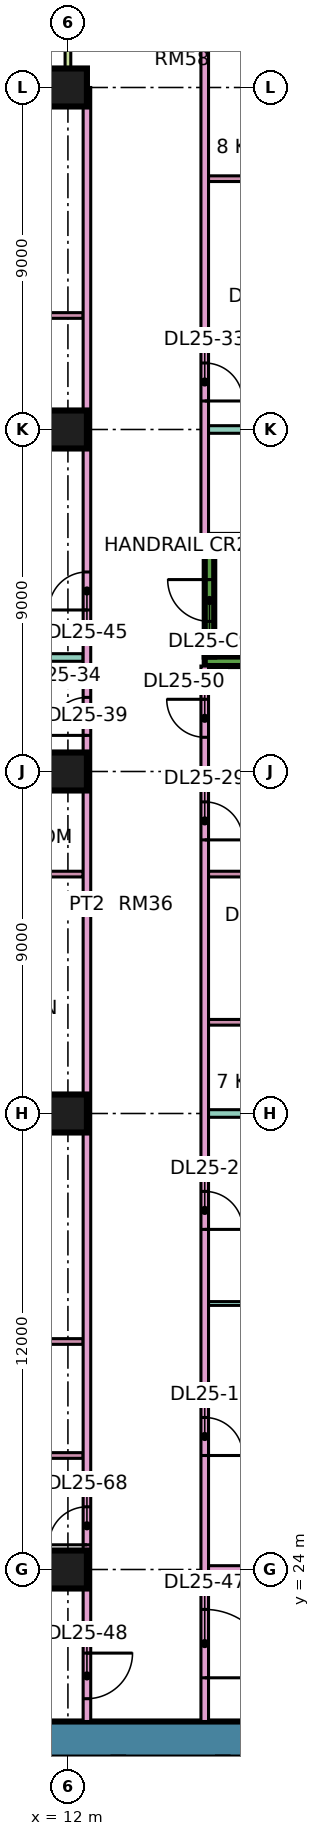
"""IFC4 building model, lengths in metres.
Left out: names, types, materials, properties, quantities, classifications, styles, units other than length and angle.
Written with IfcOpenShell. Run it as: python <this file> out.ifc"""

import sys

from ifc_helpers import new_model, si_unit, direction, frame, frame_2d, origin, origin_2d, place, context, subcontext, project, spatial, rectangle, extrude, element, fill, save


model = new_model("IFC4")
c1 = context("Model", 3, precision=1e-05, world=origin(), true_north=direction((0.0, 1.0)))
c2 = subcontext(c1, "Body", "Model", "MODEL_VIEW")
j1 = project(units=[si_unit("LENGTHUNIT", "METRE"), si_unit("PLANEANGLEUNIT", "RADIAN")], contexts=[c1])
p1 = place(None, origin())
s1 = spatial("IfcSite", under=j1, at=p1, CompositionType="ELEMENT")
p2 = place(p1, origin())
s2 = spatial("IfcBuilding", under=s1, at=p2, CompositionType="ELEMENT")
p3 = place(p2, frame((0.0, 0.0, 110.65)))
s3 = spatial("IfcBuildingStorey", under=s2, at=p3, CompositionType="ELEMENT", Elevation=110.65)
for number, where, z_axis, x_axis in (
    (1, (12.0, 24.0, 0.0), (0.0, 0.0, 1.0), (1.0, 0.0, 0.0)),
    (2, (12.0, 36.0, 0.0), (0.0, 0.0, 1.0), (1.0, 0.0, 0.0)),
    (3, (12.0, 45.0, 0.0), (0.0, 0.0, 1.0), (1.0, 0.0, 0.0)),
    (4, (12.0, 54.0, 0.0), (0.0, 0.0, 1.0), (1.0, 0.0, 0.0)),
    (5, (12.0, 63.0, 0.0), (0.0, 0.0, 1.0), (1.0, 0.0, 0.0)),
):
    element("IfcColumn", number, at=place(p3, frame(where, z_axis=z_axis, x_axis=x_axis)), inside=s3, PredefinedType="COLUMN", context=c2, shape_type="SweptSolid", body=[
        extrude(rectangle(XDim=1.0, YDim=1.0, at=origin_2d()), origin(), (0.0, 0.0, 1.0), 3.75),
    ])
p4 = place(p3, frame((9.0, 19.525, 0.0), z_axis=(0.0, 0.0, 1.0), x_axis=(1.0, 0.0, 0.0)))
e6 = element("IfcWall", 6, at=p4, inside=s3, PredefinedType="SHEAR", context=c2, shape_type="SweptSolid", body=[
    extrude(rectangle(XDim=25.0, YDim=0.95, at=frame_2d((12.5, 0.0))), origin(), (0.0, 0.0, 1.0), 3.75),
])
p5 = place(p4, frame((19.1, 0.0, 0.0)))
e7 = element("IfcOpeningElement", 7, at=p5, cuts=e6, PredefinedType="OPENING", context=c2, shape_type="SweptSolid", body=[
    extrude(rectangle(XDim=1.8, YDim=2.4, at=frame_2d((0.9, 1.2))), frame((0.0, 0.485, 0.0), z_axis=(0.0, -1.0, 0.0), x_axis=(1.0, 0.0, 0.0)), (0.0, 0.0, 1.0), 0.97),
])
for number, where, z_axis, x_axis in (
    (8, (15.6, 47.9, 0.0), (0.0, 0.0, 1.0), (1.0, 0.0, 0.0)),
    (9, (15.6, 51.1, 0.0), (0.0, 0.0, 1.0), (1.0, 0.0, 0.0)),
):
    element("IfcWall", number, at=place(p3, frame(where, z_axis=z_axis, x_axis=x_axis)), inside=s3, PredefinedType="SHEAR", context=c2, shape_type="SweptSolid", body=[
        extrude(rectangle(XDim=7.0, YDim=0.25, at=frame_2d((3.5, 0.0))), origin(), (0.0, 0.0, 1.0), 3.75),
    ])
p6 = place(p3, frame((15.725, 48.025, 0.0), z_axis=(0.0, 0.0, 1.0), x_axis=(0.0, 1.0, 0.0)))
e10 = element("IfcWall", 10, at=p6, inside=s3, PredefinedType="SHEAR", context=c2, shape_type="SweptSolid", body=[
    extrude(rectangle(XDim=2.95, YDim=0.25, at=frame_2d((1.475, 0.0))), origin(), (0.0, 0.0, 1.0), 3.75),
])
p7 = place(p6, frame((0.925, 0.0, 0.0)))
e11 = element("IfcOpeningElement", 11, at=p7, cuts=e10, PredefinedType="OPENING", context=c2, shape_type="SweptSolid", body=[
    extrude(rectangle(XDim=1.1, YDim=2.2, at=frame_2d((0.55, 1.1))), frame((0.0, 0.135, 0.0), z_axis=(0.0, -1.0, 0.0), x_axis=(1.0, 0.0, 0.0)), (0.0, 0.0, 1.0), 0.27),
])
p8 = place(p3, frame((11.925, 63.0, 0.0), z_axis=(0.0, 0.0, 1.0), x_axis=(-1.0, 0.0, 0.0)))
e12 = element("IfcWall", 12, at=p8, inside=s3, PredefinedType="SOLIDWALL", context=c2, shape_type="SweptSolid", body=[
    extrude(rectangle(XDim=10.35, YDim=0.15, at=frame_2d((5.175, 0.0))), origin(), (0.0, 0.0, 1.0), 3.35),
])
p9 = place(p8, frame((1.175, 0.0, 0.45)))
e13 = element("IfcOpeningElement", 13, at=p9, cuts=e12, PredefinedType="OPENING", context=c2, shape_type="SweptSolid", body=[
    extrude(rectangle(XDim=3.0, YDim=2.4, at=frame_2d((1.5, 1.2))), frame((0.0, 0.085, 0.0), z_axis=(0.0, -1.0, 0.0), x_axis=(1.0, 0.0, 0.0)), (0.0, 0.0, 1.0), 0.17),
])
p10 = place(p8, frame((7.288, 0.0, 0.0)))
e14 = element("IfcOpeningElement", 14, at=p10, cuts=e12, PredefinedType="OPENING", context=c2, shape_type="SweptSolid", body=[
    extrude(rectangle(XDim=1.8, YDim=2.4, at=frame_2d((0.9, 1.2))), frame((0.0, 0.085, 0.0), z_axis=(0.0, -1.0, 0.0), x_axis=(1.0, 0.0, 0.0)), (0.0, 0.0, 1.0), 0.17),
])
p11 = place(p3, frame((12.0, 64.5, 0.0), z_axis=(0.0, 0.0, 1.0), x_axis=(0.0, -1.0, 0.0)))
e15 = element("IfcWall", 15, at=p11, inside=s3, PredefinedType="SOLIDWALL", context=c2, shape_type="SweptSolid", body=[
    extrude(rectangle(XDim=1.5, YDim=0.15, at=frame_2d((0.75, 0.0))), origin(), (0.0, 0.0, 1.0), 3.35),
])
p12 = place(p3, frame((-1.35, 22.4, 0.0), z_axis=(0.0, 0.0, 1.0), x_axis=(1.0, 0.0, 0.0)))
e16 = element("IfcWall", 16, at=p12, inside=s3, PredefinedType="PARTITIONING", context=c2, shape_type="SweptSolid", body=[
    extrude(rectangle(XDim=13.75, YDim=0.2, at=frame_2d((6.875, 0.0))), origin(), (0.0, 0.0, 1.0), 3.35),
])
p13 = place(p3, frame((0.0, 36.0, 0.0), z_axis=(0.0, 0.0, 1.0), x_axis=(1.0, 0.0, 0.0)))
e17 = element("IfcWall", 17, at=p13, inside=s3, PredefinedType="PARTITIONING", context=c2, shape_type="SweptSolid", body=[
    extrude(rectangle(XDim=12.4, YDim=0.2, at=frame_2d((6.2, 0.0))), origin(), (0.0, 0.0, 1.0), 3.35),
])
p14 = place(p3, frame((0.0, 48.0, 0.0), z_axis=(0.0, 0.0, 1.0), x_axis=(1.0, 0.0, 0.0)))
e18 = element("IfcWall", 18, at=p14, inside=s3, PredefinedType="PARTITIONING", context=c2, shape_type="SweptSolid", body=[
    extrude(rectangle(XDim=12.4, YDim=0.2, at=frame_2d((6.2, 0.0))), origin(), (0.0, 0.0, 1.0), 3.35),
])
for number, where, z_axis, x_axis in (
    (19, (7.175, 27.0, 0.0), (0.0, 0.0, 1.0), (1.0, 0.0, 0.0)),
    (20, (7.175, 30.0, 0.0), (0.0, 0.0, 1.0), (1.0, 0.0, 0.0)),
    (21, (7.175, 53.7, 0.0), (0.0, 0.0, 1.0), (1.0, 0.0, 0.0)),
    (22, (7.175, 57.0, 0.0), (0.0, 0.0, 1.0), (1.0, 0.0, 0.0)),
):
    element("IfcWall", number, at=place(p3, frame(where, z_axis=z_axis, x_axis=x_axis)), inside=s3, PredefinedType="PARTITIONING", context=c2, shape_type="SweptSolid", body=[
        extrude(rectangle(XDim=5.225, YDim=0.15, at=frame_2d((2.612, 0.0))), origin(), (0.0, 0.0, 1.0), 3.35),
    ])
p15 = place(p3, frame((8.375, 42.3, 0.0), z_axis=(0.0, 0.0, 1.0), x_axis=(1.0, 0.0, 0.0)))
e23 = element("IfcWall", 23, at=p15, inside=s3, PredefinedType="PARTITIONING", context=c2, shape_type="SweptSolid", body=[
    extrude(rectangle(XDim=4.025, YDim=0.15, at=frame_2d((2.012, 0.0))), origin(), (0.0, 0.0, 1.0), 3.35),
])
p16 = place(p3, frame((8.375, 45.0, 0.0), z_axis=(0.0, 0.0, 1.0), x_axis=(1.0, 0.0, 0.0)))
e24 = element("IfcWall", 24, at=p16, inside=s3, PredefinedType="PARTITIONING", context=c2, shape_type="SweptSolid", body=[
    extrude(rectangle(XDim=4.025, YDim=0.15, at=frame_2d((2.012, 0.0))), origin(), (0.0, 0.0, 1.0), 3.35),
])
p17 = place(p16, frame((1.575, 0.0, 0.0)))
e25 = element("IfcOpeningElement", 25, at=p17, cuts=e24, PredefinedType="OPENING", context=c2, shape_type="SweptSolid", body=[
    extrude(rectangle(XDim=0.8, YDim=2.1, at=frame_2d((0.4, 1.05))), frame((0.0, 0.085, 0.0), z_axis=(0.0, -1.0, 0.0), x_axis=(1.0, 0.0, 0.0)), (0.0, 0.0, 1.0), 0.17),
])
p18 = place(p3, frame((12.5, 20.0, 0.0), z_axis=(0.0, 0.0, 1.0), x_axis=(0.0, 1.0, 0.0)))
e26 = element("IfcWall", 26, at=p18, inside=s3, PredefinedType="PARTITIONING", context=c2, shape_type="SweptSolid", body=[
    extrude(rectangle(XDim=43.0, YDim=0.2, at=frame_2d((21.5, 0.0))), origin(), (0.0, 0.0, 1.0), 3.35),
])
p19 = place(p18, frame((25.95, 0.0, 0.0)))
e27 = element("IfcOpeningElement", 27, at=p19, cuts=e26, PredefinedType="OPENING", context=c2, shape_type="SweptSolid", body=[
    extrude(rectangle(XDim=1.0, YDim=2.1, at=frame_2d((0.5, 1.05))), frame((0.0, 0.11, 0.0), z_axis=(0.0, -1.0, 0.0), x_axis=(1.0, 0.0, 0.0)), (0.0, 0.0, 1.0), 0.22),
])
p20 = place(p18, frame((29.25, 0.0, 0.0)))
e28 = element("IfcOpeningElement", 28, at=p20, cuts=e26, PredefinedType="OPENING", context=c2, shape_type="SweptSolid", body=[
    extrude(rectangle(XDim=1.0, YDim=2.1, at=frame_2d((0.5, 1.05))), frame((0.0, 0.11, 0.0), z_axis=(0.0, -1.0, 0.0), x_axis=(1.0, 0.0, 0.0)), (0.0, 0.0, 1.0), 0.22),
])
p21 = place(p18, frame((0.6, 0.0, 0.0)))
e29 = element("IfcOpeningElement", 29, at=p21, cuts=e26, PredefinedType="OPENING", context=c2, shape_type="SweptSolid", body=[
    extrude(rectangle(XDim=1.2, YDim=2.1, at=frame_2d((0.6, 1.05))), frame((0.0, 0.11, 0.0), z_axis=(0.0, -1.0, 0.0), x_axis=(1.0, 0.0, 0.0)), (0.0, 0.0, 1.0), 0.22),
])
p22 = place(p18, frame((4.65, 0.0, 0.0)))
e30 = element("IfcOpeningElement", 30, at=p22, cuts=e26, PredefinedType="OPENING", context=c2, shape_type="SweptSolid", body=[
    extrude(rectangle(XDim=1.0, YDim=2.1, at=frame_2d((0.5, 1.05))), frame((0.0, 0.11, 0.0), z_axis=(0.0, -1.0, 0.0), x_axis=(1.0, 0.0, 0.0)), (0.0, 0.0, 1.0), 0.22),
])
p23 = place(p3, frame((15.6, 20.0, 0.0), z_axis=(0.0, 0.0, 1.0), x_axis=(0.0, 1.0, 0.0)))
e31 = element("IfcWall", 31, at=p23, inside=s3, PredefinedType="PARTITIONING", context=c2, shape_type="SweptSolid", body=[
    extrude(rectangle(XDim=27.775, YDim=0.2, at=frame_2d((13.887, 0.0))), origin(), (0.0, 0.0, 1.0), 3.35),
])
p24 = place(p23, frame((7.0, 0.0, 0.0)))
e32 = element("IfcOpeningElement", 32, at=p24, cuts=e31, PredefinedType="OPENING", context=c2, shape_type="SweptSolid", body=[
    extrude(rectangle(XDim=1.0, YDim=2.1, at=frame_2d((0.5, 1.05))), frame((0.0, 0.11, 0.0), z_axis=(0.0, -1.0, 0.0), x_axis=(1.0, 0.0, 0.0)), (0.0, 0.0, 1.0), 0.22),
])
p25 = place(p23, frame((12.95, 0.0, 0.0)))
e33 = element("IfcOpeningElement", 33, at=p25, cuts=e31, PredefinedType="OPENING", context=c2, shape_type="SweptSolid", body=[
    extrude(rectangle(XDim=1.0, YDim=2.1, at=frame_2d((0.5, 1.05))), frame((0.0, 0.11, 0.0), z_axis=(0.0, -1.0, 0.0), x_axis=(1.0, 0.0, 0.0)), (0.0, 0.0, 1.0), 0.22),
])
p26 = place(p23, frame((23.2, 0.0, 0.0)))
e34 = element("IfcOpeningElement", 34, at=p26, cuts=e31, PredefinedType="OPENING", context=c2, shape_type="SweptSolid", body=[
    extrude(rectangle(XDim=1.0, YDim=2.1, at=frame_2d((0.5, 1.05))), frame((0.0, 0.11, 0.0), z_axis=(0.0, -1.0, 0.0), x_axis=(1.0, 0.0, 0.0)), (0.0, 0.0, 1.0), 0.22),
])
p27 = place(p23, frame((1.15, 0.0, 0.0)))
e35 = element("IfcOpeningElement", 35, at=p27, cuts=e31, PredefinedType="OPENING", context=c2, shape_type="SweptSolid", body=[
    extrude(rectangle(XDim=1.8, YDim=2.1, at=frame_2d((0.9, 1.05))), frame((0.0, 0.11, 0.0), z_axis=(0.0, -1.0, 0.0), x_axis=(1.0, 0.0, 0.0)), (0.0, 0.0, 1.0), 0.22),
])
p28 = place(p23, frame((25.9, 0.0, 0.0)))
e36 = element("IfcOpeningElement", 36, at=p28, cuts=e31, PredefinedType="OPENING", context=c2, shape_type="SweptSolid", body=[
    extrude(rectangle(XDim=1.0, YDim=2.1, at=frame_2d((0.5, 1.05))), frame((0.0, 0.11, 0.0), z_axis=(0.0, -1.0, 0.0), x_axis=(1.0, 0.0, 0.0)), (0.0, 0.0, 1.0), 0.22),
])
p29 = place(p3, frame((15.6, 51.225, 0.0), z_axis=(0.0, 0.0, 1.0), x_axis=(0.0, 1.0, 0.0)))
e37 = element("IfcWall", 37, at=p29, inside=s3, PredefinedType="PARTITIONING", context=c2, shape_type="SweptSolid", body=[
    extrude(rectangle(XDim=13.125, YDim=0.2, at=frame_2d((6.562, 0.0))), origin(), (0.0, 0.0, 1.0), 3.35),
])
p30 = place(p29, frame((3.525, 0.0, 0.0)))
e38 = element("IfcOpeningElement", 38, at=p30, cuts=e37, PredefinedType="OPENING", context=c2, shape_type="SweptSolid", body=[
    extrude(rectangle(XDim=1.0, YDim=2.1, at=frame_2d((0.5, 1.05))), frame((0.0, 0.11, 0.0), z_axis=(0.0, -1.0, 0.0), x_axis=(1.0, 0.0, 0.0)), (0.0, 0.0, 1.0), 0.22),
])
p31 = place(p3, frame((15.7, 24.0, 0.0), z_axis=(0.0, 0.0, 1.0), x_axis=(1.0, 0.0, 0.0)))
e39 = element("IfcWall", 39, at=p31, inside=s3, PredefinedType="PARTITIONING", context=c2, shape_type="SweptSolid", body=[
    extrude(rectangle(XDim=5.8, YDim=0.2, at=frame_2d((2.9, 0.0))), origin(), (0.0, 0.0, 1.0), 3.35),
])
p32 = place(p3, frame((15.7, 31.0, 0.0), z_axis=(0.0, 0.0, 1.0), x_axis=(1.0, 0.0, 0.0)))
e40 = element("IfcWall", 40, at=p32, inside=s3, PredefinedType="PARTITIONING", context=c2, shape_type="SweptSolid", body=[
    extrude(rectangle(XDim=5.8, YDim=0.1, at=frame_2d((2.9, 0.0))), origin(), (0.0, 0.0, 1.0), 3.35),
])
p33 = place(p3, frame((15.7, 36.0, 0.0), z_axis=(0.0, 0.0, 1.0), x_axis=(1.0, 0.0, 0.0)))
e41 = element("IfcWall", 41, at=p33, inside=s3, PredefinedType="PARTITIONING", context=c2, shape_type="SweptSolid", body=[
    extrude(rectangle(XDim=8.3, YDim=0.2, at=frame_2d((4.15, 0.0))), origin(), (0.0, 0.0, 1.0), 3.35),
])
p34 = place(p3, frame((15.7, 38.4, 0.0), z_axis=(0.0, 0.0, 1.0), x_axis=(1.0, 0.0, 0.0)))
e42 = element("IfcWall", 42, at=p34, inside=s3, PredefinedType="PARTITIONING", context=c2, shape_type="SweptSolid", body=[
    extrude(rectangle(XDim=3.125, YDim=0.15, at=frame_2d((1.562, 0.0))), origin(), (0.0, 0.0, 1.0), 3.35),
])
p35 = place(p3, frame((15.7, 42.3, 0.0), z_axis=(0.0, 0.0, 1.0), x_axis=(1.0, 0.0, 0.0)))
e43 = element("IfcWall", 43, at=p35, inside=s3, PredefinedType="PARTITIONING", context=c2, shape_type="SweptSolid", body=[
    extrude(rectangle(XDim=3.125, YDim=0.15, at=frame_2d((1.562, 0.0))), origin(), (0.0, 0.0, 1.0), 3.35),
])
p36 = place(p35, frame((1.1, 0.0, 0.0)))
e44 = element("IfcOpeningElement", 44, at=p36, cuts=e43, PredefinedType="OPENING", context=c2, shape_type="SweptSolid", body=[
    extrude(rectangle(XDim=0.8, YDim=2.1, at=frame_2d((0.4, 1.05))), frame((0.0, 0.085, 0.0), z_axis=(0.0, -1.0, 0.0), x_axis=(1.0, 0.0, 0.0)), (0.0, 0.0, 1.0), 0.17),
])
p37 = place(p3, frame((15.7, 45.0, 0.0), z_axis=(0.0, 0.0, 1.0), x_axis=(1.0, 0.0, 0.0)))
e45 = element("IfcWall", 45, at=p37, inside=s3, PredefinedType="PARTITIONING", context=c2, shape_type="SweptSolid", body=[
    extrude(rectangle(XDim=8.3, YDim=0.2, at=frame_2d((4.15, 0.0))), origin(), (0.0, 0.0, 1.0), 3.35),
])
p38 = place(p3, frame((15.7, 54.0, 0.0), z_axis=(0.0, 0.0, 1.0), x_axis=(1.0, 0.0, 0.0)))
e46 = element("IfcWall", 46, at=p38, inside=s3, PredefinedType="PARTITIONING", context=c2, shape_type="SweptSolid", body=[
    extrude(rectangle(XDim=8.226, YDim=0.2, at=frame_2d((4.113, 0.0))), origin(), (0.0, 0.0, 1.0), 3.35),
])
p39 = place(p3, frame((15.7, 56.4, 0.0), z_axis=(0.0, 0.0, 1.0), x_axis=(1.0, 0.0, 0.0)))
e47 = element("IfcWall", 47, at=p39, inside=s3, PredefinedType="PARTITIONING", context=c2, shape_type="SweptSolid", body=[
    extrude(rectangle(XDim=3.125, YDim=0.15, at=frame_2d((1.562, 0.0))), origin(), (0.0, 0.0, 1.0), 3.35),
])
p40 = place(p39, frame((1.2, 0.0, 0.0)))
e48 = element("IfcOpeningElement", 48, at=p40, cuts=e47, PredefinedType="OPENING", context=c2, shape_type="SweptSolid", body=[
    extrude(rectangle(XDim=0.8, YDim=2.1, at=frame_2d((0.4, 1.05))), frame((0.0, 0.085, 0.0), z_axis=(0.0, -1.0, 0.0), x_axis=(1.0, 0.0, 0.0)), (0.0, 0.0, 1.0), 0.17),
])
p41 = place(p3, frame((15.7, 60.6, 0.0), z_axis=(0.0, 0.0, 1.0), x_axis=(1.0, 0.0, 0.0)))
e49 = element("IfcWall", 49, at=p41, inside=s3, PredefinedType="PARTITIONING", context=c2, shape_type="SweptSolid", body=[
    extrude(rectangle(XDim=3.125, YDim=0.15, at=frame_2d((1.562, 0.0))), origin(), (0.0, 0.0, 1.0), 3.35),
])
p42 = place(p7, frame((1.1, 0.0, 0.0), z_axis=(0.0, 0.0, 1.0), x_axis=(-1.0, 0.0, 0.0)))
e50 = element("IfcDoor", 50, at=p42, inside=s3, OperationType="SINGLE_SWING_RIGHT", PredefinedType="DOOR", context=c2, shape_type="SweptSolid", body=[
    extrude(rectangle(XDim=1.1, YDim=2.2, at=frame_2d((0.55, 1.1))), frame((0.0, 0.025, 0.0), z_axis=(0.0, -1.0, 0.0), x_axis=(1.0, 0.0, 0.0)), (0.0, 0.0, 1.0), 0.05),
])
fill(e11, e50)
p43 = place(p24, frame((1.0, 0.0, 0.0), z_axis=(0.0, 0.0, 1.0), x_axis=(-1.0, 0.0, 0.0)))
e51 = element("IfcDoor", 51, at=p43, inside=s3, OperationType="SINGLE_SWING_LEFT", PredefinedType="DOOR", context=c2, shape_type="SweptSolid", body=[
    extrude(rectangle(XDim=1.0, YDim=2.1, at=frame_2d((0.5, 1.05))), frame((0.0, 0.025, 0.0), z_axis=(0.0, -1.0, 0.0), x_axis=(1.0, 0.0, 0.0)), (0.0, 0.0, 1.0), 0.05),
])
fill(e32, e51)
p44 = place(p25, frame((1.0, 0.0, 0.0), z_axis=(0.0, 0.0, 1.0), x_axis=(-1.0, 0.0, 0.0)))
e52 = element("IfcDoor", 52, at=p44, inside=s3, OperationType="SINGLE_SWING_LEFT", PredefinedType="DOOR", context=c2, shape_type="SweptSolid", body=[
    extrude(rectangle(XDim=1.0, YDim=2.1, at=frame_2d((0.5, 1.05))), frame((0.0, 0.025, 0.0), z_axis=(0.0, -1.0, 0.0), x_axis=(1.0, 0.0, 0.0)), (0.0, 0.0, 1.0), 0.05),
])
fill(e33, e52)
p45 = place(p26, frame((1.0, 0.0, 0.0), z_axis=(0.0, 0.0, 1.0), x_axis=(-1.0, 0.0, 0.0)))
e53 = element("IfcDoor", 53, at=p45, inside=s3, OperationType="SINGLE_SWING_LEFT", PredefinedType="DOOR", context=c2, shape_type="SweptSolid", body=[
    extrude(rectangle(XDim=1.0, YDim=2.1, at=frame_2d((0.5, 1.05))), frame((0.0, 0.025, 0.0), z_axis=(0.0, -1.0, 0.0), x_axis=(1.0, 0.0, 0.0)), (0.0, 0.0, 1.0), 0.05),
])
fill(e34, e53)
p46 = place(p30, frame((1.0, 0.0, 0.0), z_axis=(0.0, 0.0, 1.0), x_axis=(-1.0, 0.0, 0.0)))
e54 = element("IfcDoor", 54, at=p46, inside=s3, OperationType="SINGLE_SWING_LEFT", PredefinedType="DOOR", context=c2, shape_type="SweptSolid", body=[
    extrude(rectangle(XDim=1.0, YDim=2.1, at=frame_2d((0.5, 1.05))), frame((0.0, 0.025, 0.0), z_axis=(0.0, -1.0, 0.0), x_axis=(1.0, 0.0, 0.0)), (0.0, 0.0, 1.0), 0.05),
])
fill(e38, e54)
p47 = place(p19, origin())
e55 = element("IfcDoor", 55, at=p47, inside=s3, OperationType="SINGLE_SWING_LEFT", PredefinedType="DOOR", context=c2, shape_type="SweptSolid", body=[
    extrude(rectangle(XDim=1.0, YDim=2.1, at=frame_2d((0.5, 1.05))), frame((0.0, 0.025, 0.0), z_axis=(0.0, -1.0, 0.0), x_axis=(1.0, 0.0, 0.0)), (0.0, 0.0, 1.0), 0.05),
])
fill(e27, e55)
p48 = place(p20, origin())
e56 = element("IfcDoor", 56, at=p48, inside=s3, OperationType="SINGLE_SWING_LEFT", PredefinedType="DOOR", context=c2, shape_type="SweptSolid", body=[
    extrude(rectangle(XDim=1.0, YDim=2.1, at=frame_2d((0.5, 1.05))), frame((0.0, 0.025, 0.0), z_axis=(0.0, -1.0, 0.0), x_axis=(1.0, 0.0, 0.0)), (0.0, 0.0, 1.0), 0.05),
])
fill(e28, e56)
p49 = place(p27, frame((1.8, 0.0, 0.0), z_axis=(0.0, 0.0, 1.0), x_axis=(-1.0, 0.0, 0.0)))
e57 = element("IfcDoor", 57, at=p49, inside=s3, OperationType="DOUBLE_DOOR_SINGLE_SWING", PredefinedType="DOOR", context=c2, shape_type="SweptSolid", body=[
    extrude(rectangle(XDim=1.8, YDim=2.1, at=frame_2d((0.9, 1.05))), frame((0.0, 0.025, 0.0), z_axis=(0.0, -1.0, 0.0), x_axis=(1.0, 0.0, 0.0)), (0.0, 0.0, 1.0), 0.05),
])
fill(e35, e57)
p50 = place(p21, origin())
e58 = element("IfcDoor", 58, at=p50, inside=s3, OperationType="SINGLE_SWING_RIGHT", PredefinedType="DOOR", context=c2, shape_type="SweptSolid", body=[
    extrude(rectangle(XDim=1.2, YDim=2.1, at=frame_2d((0.6, 1.05))), frame((0.0, 0.025, 0.0), z_axis=(0.0, -1.0, 0.0), x_axis=(1.0, 0.0, 0.0)), (0.0, 0.0, 1.0), 0.05),
])
fill(e29, e58)
p51 = place(p28, frame((1.0, 0.0, 0.0), z_axis=(0.0, 0.0, 1.0), x_axis=(-1.0, 0.0, 0.0)))
e59 = element("IfcDoor", 59, at=p51, inside=s3, OperationType="SINGLE_SWING_RIGHT", PredefinedType="DOOR", context=c2, shape_type="SweptSolid", body=[
    extrude(rectangle(XDim=1.0, YDim=2.1, at=frame_2d((0.5, 1.05))), frame((0.0, 0.025, 0.0), z_axis=(0.0, -1.0, 0.0), x_axis=(1.0, 0.0, 0.0)), (0.0, 0.0, 1.0), 0.05),
])
fill(e36, e59)
p52 = place(p22, origin())
e60 = element("IfcDoor", 60, at=p52, inside=s3, OperationType="SINGLE_SWING_LEFT", PredefinedType="DOOR", context=c2, shape_type="SweptSolid", body=[
    extrude(rectangle(XDim=1.0, YDim=2.1, at=frame_2d((0.5, 1.05))), frame((0.0, 0.025, 0.0), z_axis=(0.0, -1.0, 0.0), x_axis=(1.0, 0.0, 0.0)), (0.0, 0.0, 1.0), 0.05),
])
fill(e30, e60)
save(model, sys.argv[1])
